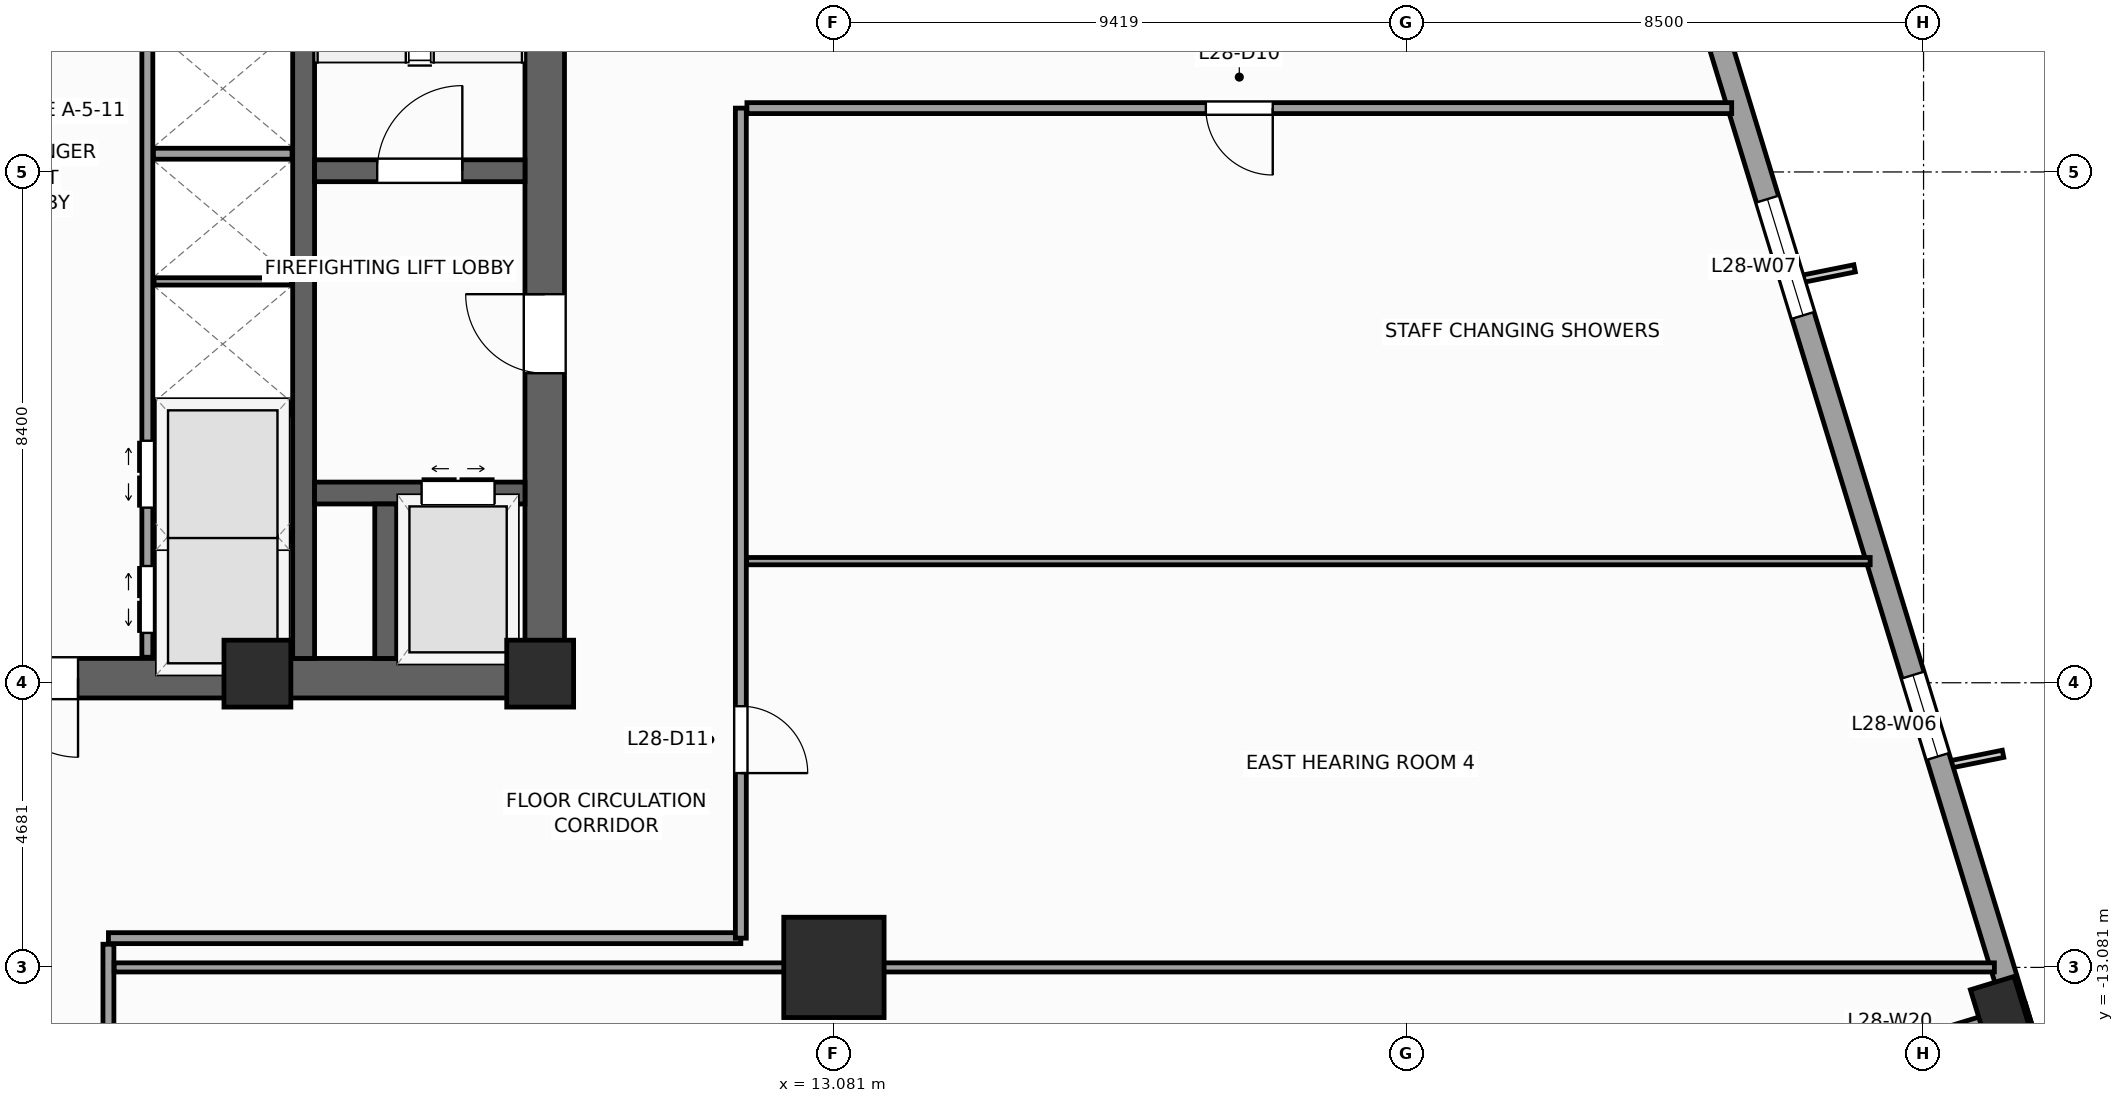
"""IFC4 building model, lengths in metres.
Left out: names, types, materials, properties, quantities, classifications, styles, units other than length and angle.
Written with IfcOpenShell. Run it as: python <this file> out.ifc"""

import sys

from ifc_helpers import new_model, si_unit, direction, frame, frame_2d, origin, origin_2d, place, context, subcontext, project, spatial, rectangle, extrude, source, transform, mapped, element, fill, save


model = new_model("IFC4")
c1 = context("Model", 3, precision=1e-05, world=origin(), true_north=direction((0.0, 1.0)))
c2 = subcontext(c1, "Body", "Model", "MODEL_VIEW")
j1 = project(units=[si_unit("LENGTHUNIT", "METRE"), si_unit("PLANEANGLEUNIT", "RADIAN")], contexts=[c1])
p1 = place(None, origin())
s1 = spatial("IfcSite", under=j1, at=p1, CompositionType="ELEMENT")
p2 = place(p1, origin())
s2 = spatial("IfcBuilding", under=s1, at=p2, CompositionType="ELEMENT")
p3 = place(p2, frame((0.0, 0.0, 119.2)))
s3 = spatial("IfcBuildingStorey", under=s2, at=p3, CompositionType="ELEMENT", Elevation=119.2)
p4 = place(p3, frame((-8.65, -8.325, 0.0), z_axis=(0.0, 0.0, 1.0), x_axis=(1.0, 0.0, 0.0)))
e1 = element("IfcWall", 1, at=p4, inside=s3, PredefinedType="SHEAR", context=c2, shape_type="SweptSolid", body=[
    extrude(rectangle(XDim=17.3, YDim=0.65, at=frame_2d((8.65, 0.0))), origin(), (0.0, 0.0, 1.0), 4.0),
])
p5 = place(p4, frame((8.0, 0.0, 0.0)))
e2 = element("IfcOpeningElement", 2, at=p5, cuts=e1, PredefinedType="OPENING", context=c2, shape_type="SweptSolid", body=[
    extrude(rectangle(XDim=1.3, YDim=2.2, at=frame_2d((0.65, 1.1))), frame((0.0, 0.335, 0.0), z_axis=(0.0, -1.0, 0.0), x_axis=(1.0, 0.0, 0.0)), (0.0, 0.0, 1.0), 0.67),
])
p6 = place(p3, frame((8.325, -8.0, 0.0), z_axis=(0.0, 0.0, 1.0), x_axis=(0.0, 1.0, 0.0)))
e3 = element("IfcWall", 3, at=p6, inside=s3, PredefinedType="SHEAR", context=c2, shape_type="SweptSolid", body=[
    extrude(rectangle(XDim=16.0, YDim=0.65, at=frame_2d((8.0, 0.0))), origin(), (0.0, 0.0, 1.0), 4.0),
])
p7 = place(p6, frame((4.69, 0.0, 0.0)))
e4 = element("IfcOpeningElement", 4, at=p7, cuts=e3, PredefinedType="OPENING", context=c2, shape_type="SweptSolid", body=[
    extrude(rectangle(XDim=1.3, YDim=2.2, at=frame_2d((0.65, 1.1))), frame((0.0, 0.335, 0.0), z_axis=(0.0, -1.0, 0.0), x_axis=(1.0, 0.0, 0.0)), (0.0, 0.0, 1.0), 0.67),
])
p8 = place(p3, frame((4.36, -8.0, 0.0), z_axis=(0.0, 0.0, 1.0), x_axis=(0.0, 1.0, 0.0)))
e5 = element("IfcWall", 5, at=p8, inside=s3, PredefinedType="SHEAR", context=c2, shape_type="SweptSolid", body=[
    extrude(rectangle(XDim=16.0, YDim=0.36, at=frame_2d((8.0, 0.0))), origin(), (0.0, 0.0, 1.0), 4.0),
])
p9 = place(p3, frame((4.54, 0.02, 0.0), z_axis=(0.0, 0.0, 1.0), x_axis=(1.0, 0.0, 0.0)))
e6 = element("IfcWall", 6, at=p9, inside=s3, PredefinedType="SHEAR", context=c2, shape_type="SweptSolid", body=[
    extrude(rectangle(XDim=3.46, YDim=0.36, at=frame_2d((1.73, 0.0))), origin(), (0.0, 0.0, 1.0), 4.0),
])
p10 = place(p9, frame((1.03, 0.0, 0.0)))
e7 = element("IfcOpeningElement", 7, at=p10, cuts=e6, PredefinedType="OPENING", context=c2, shape_type="SweptSolid", body=[
    extrude(rectangle(XDim=1.4, YDim=2.2, at=frame_2d((0.7, 1.1))), frame((0.0, 0.19, 0.0), z_axis=(0.0, -1.0, 0.0), x_axis=(1.0, 0.0, 0.0)), (0.0, 0.0, 1.0), 0.38),
])
p11 = place(p3, frame((4.54, -5.28, 0.0), z_axis=(0.0, 0.0, 1.0), x_axis=(1.0, 0.0, 0.0)))
e8 = element("IfcWall", 8, at=p11, inside=s3, PredefinedType="SHEAR", context=c2, shape_type="SweptSolid", body=[
    extrude(rectangle(XDim=3.46, YDim=0.36, at=frame_2d((1.73, 0.0))), origin(), (0.0, 0.0, 1.0), 4.0),
])
p12 = place(p11, frame((1.76, 0.0, 0.0)))
e9 = element("IfcOpeningElement", 9, at=p12, cuts=e8, PredefinedType="OPENING", context=c2, shape_type="SweptSolid", body=[
    extrude(rectangle(XDim=1.2, YDim=2.25, at=frame_2d((0.6, 1.125))), frame((0.0, 0.19, 0.0), z_axis=(0.0, -1.0, 0.0), x_axis=(1.0, 0.0, 0.0)), (0.0, 0.0, 1.0), 0.38),
])
p13 = place(p3, frame((5.71, -8.0, 0.0), z_axis=(0.0, 0.0, 1.0), x_axis=(0.0, 1.0, 0.0)))
e10 = element("IfcWall", 10, at=p13, inside=s3, PredefinedType="SHEAR", context=c2, shape_type="SweptSolid", body=[
    extrude(rectangle(XDim=2.54, YDim=0.36, at=frame_2d((1.27, 0.0))), origin(), (0.0, 0.0, 1.0), 4.0),
])
m1 = source(origin(), c2, "Body", "SweptSolid", [
    extrude(rectangle(XDim=1.1, YDim=1.1, at=origin_2d()), origin(), (0.0, 0.0, 1.0), 4.0),
])
for number, where, z_axis, x_axis in (
    (11, (8.25, -8.25, 0.0), (0.0, 0.0, 1.0), (1.0, 0.0, 0.0)),
    (12, (3.6, -8.25, 0.0), (0.0, 0.0, 1.0), (1.0, 0.0, 0.0)),
):
    element("IfcColumn", number, at=place(p3, frame(where, z_axis=z_axis, x_axis=x_axis)), inside=s3, PredefinedType="PILASTER", context=c2, shape_type="MappedRepresentation", body=[
        mapped(m1, transform((0.0, 0.0, 0.0), scale=1.0)),
    ])
m2 = source(origin(), c2, "Body", "SweptSolid", [
    extrude(rectangle(XDim=1.65, YDim=1.65, at=origin_2d()), origin(), (0.0, 0.0, 1.0), 4.0),
])
p14 = place(p3, frame((13.081, -13.081, 0.0), z_axis=(0.0, 0.0, 1.0), x_axis=(1.0, 0.0, 0.0)))
e13 = element("IfcColumn", 13, at=p14, inside=s3, PredefinedType="COLUMN", context=c2, shape_type="MappedRepresentation", body=[
    mapped(m2, transform((0.0, 0.0, 0.0), scale=1.0)),
])
m3 = source(origin(), c2, "Body", "SweptSolid", [
    extrude(rectangle(XDim=0.75, YDim=0.85, at=origin_2d()), origin(), (0.0, 0.0, 1.0), 4.0),
])
p15 = place(p3, frame((32.253, -13.746, 0.0), z_axis=(0.0, 0.0, 1.0), x_axis=(0.956304755963, 0.292371704723, 0.0)))
e14 = element("IfcColumn", 14, at=p15, inside=s3, PredefinedType="COLUMN", context=c2, shape_type="MappedRepresentation", body=[
    mapped(m3, transform((0.0, 0.0, 0.0), scale=1.0)),
])
p16 = place(p3, frame((28.482, -15.144, 0.0), z_axis=(0.0, 0.0, 1.0), x_axis=(0.956304176051, 0.292373601522, 0.0)))
e15 = element("IfcWall", 15, at=p16, inside=s3, PredefinedType="STANDARD", context=c2, shape_type="SweptSolid", body=[
    extrude(rectangle(XDim=4.44, YDim=0.38, at=frame_2d((2.22, 0.0))), origin(), (0.0, 0.0, 1.0), 3.04),
])
p17 = place(p16, frame((1.52, 0.0, 0.51)))
e16 = element("IfcOpeningElement", 16, at=p17, cuts=e15, PredefinedType="OPENING", context=c2, shape_type="SweptSolid", body=[
    extrude(rectangle(XDim=1.4, YDim=2.4, at=frame_2d((0.7, 1.2))), frame((0.0, 0.2, 0.0), z_axis=(0.0, -1.0, 0.0), x_axis=(1.0, 0.0, 0.0)), (0.0, 0.0, 1.0), 0.4),
])
p18 = place(p3, frame((32.658, -14.265, 0.0), z_axis=(0.0, 0.0, 1.0), x_axis=(-0.292373127906, 0.956304320851, 0.0)))
e17 = element("IfcWall", 17, at=p18, inside=s3, PredefinedType="STANDARD", context=c2, shape_type="SweptSolid", body=[
    extrude(rectangle(XDim=46.38, YDim=0.38, at=frame_2d((23.19, 0.0))), origin(), (0.0, 0.0, 1.0), 3.14),
])
p19 = place(p18, frame((28.265, 0.0, 0.0)))
e18 = element("IfcOpeningElement", 18, at=p19, cuts=e17, PredefinedType="OPENING", context=c2, shape_type="SweptSolid", body=[
    extrude(rectangle(XDim=1.05, YDim=2.25, at=frame_2d((0.525, 1.125))), frame((0.0, 0.2, 0.0), z_axis=(0.0, -1.0, 0.0), x_axis=(1.0, 0.0, 0.0)), (0.0, 0.0, 1.0), 0.4),
])
p20 = place(p18, frame((4.865, 0.0, 0.51)))
e19 = element("IfcOpeningElement", 19, at=p20, cuts=e17, PredefinedType="OPENING", context=c2, shape_type="SweptSolid", body=[
    extrude(rectangle(XDim=1.4, YDim=2.4, at=frame_2d((0.7, 1.2))), frame((0.0, 0.2, 0.0), z_axis=(0.0, -1.0, 0.0), x_axis=(1.0, 0.0, 0.0)), (0.0, 0.0, 1.0), 0.4),
])
p21 = place(p18, frame((12.45, 0.0, 0.51)))
e20 = element("IfcOpeningElement", 20, at=p21, cuts=e17, PredefinedType="OPENING", context=c2, shape_type="SweptSolid", body=[
    extrude(rectangle(XDim=2.0, YDim=2.4, at=frame_2d((1.0, 1.2))), frame((0.0, 0.2, 0.0), z_axis=(0.0, -1.0, 0.0), x_axis=(1.0, 0.0, 0.0)), (0.0, 0.0, 1.0), 0.4),
])
p22 = place(p18, frame((30.538, 0.0, 0.51)))
e21 = element("IfcOpeningElement", 21, at=p22, cuts=e17, PredefinedType="OPENING", context=c2, shape_type="SweptSolid", body=[
    extrude(rectangle(XDim=2.0, YDim=2.4, at=frame_2d((1.0, 1.2))), frame((0.0, 0.2, 0.0), z_axis=(0.0, -1.0, 0.0), x_axis=(1.0, 0.0, 0.0)), (0.0, 0.0, 1.0), 0.4),
])
p23 = place(p18, frame((39.187, 0.0, 0.51)))
e22 = element("IfcOpeningElement", 22, at=p23, cuts=e17, PredefinedType="OPENING", context=c2, shape_type="SweptSolid", body=[
    extrude(rectangle(XDim=1.4, YDim=2.4, at=frame_2d((0.7, 1.2))), frame((0.0, 0.2, 0.0), z_axis=(0.0, -1.0, 0.0), x_axis=(1.0, 0.0, 0.0)), (0.0, 0.0, 1.0), 0.4),
])
p24 = place(p3, frame((1.79, -7.98, 0.0), z_axis=(0.0, 0.0, 1.0), x_axis=(0.0, 1.0, 0.0)))
e23 = element("IfcWall", 23, at=p24, inside=s3, PredefinedType="PARTITIONING", context=c2, shape_type="SweptSolid", body=[
    extrude(rectangle(XDim=12.38, YDim=0.18, at=frame_2d((6.19, 0.0))), origin(), (0.0, 0.0, 1.0), 3.74),
])
p25 = place(p24, frame((0.4, 0.0, 0.0)))
e24 = element("IfcOpeningElement", 24, at=p25, cuts=e23, PredefinedType="OPENING", context=c2, shape_type="SweptSolid", body=[
    extrude(rectangle(XDim=1.1, YDim=2.2, at=frame_2d((0.55, 1.1))), frame((0.0, 0.1, 0.0), z_axis=(0.0, -1.0, 0.0), x_axis=(1.0, 0.0, 0.0)), (0.0, 0.0, 1.0), 0.2),
])
p26 = place(p24, frame((2.46, 0.0, 0.0)))
e25 = element("IfcOpeningElement", 25, at=p26, cuts=e23, PredefinedType="OPENING", context=c2, shape_type="SweptSolid", body=[
    extrude(rectangle(XDim=1.1, YDim=2.2, at=frame_2d((0.55, 1.1))), frame((0.0, 0.1, 0.0), z_axis=(0.0, -1.0, 0.0), x_axis=(1.0, 0.0, 0.0)), (0.0, 0.0, 1.0), 0.2),
])
for number, where, z_axis, x_axis in (
    (26, (1.89, -3.9, 0.0), (0.0, 0.0, 1.0), (1.0, 0.0, 0.0)),
    (27, (1.89, 0.3, 0.0), (0.0, 0.0, 1.0), (1.0, 0.0, 0.0)),
):
    element("IfcWall", number, at=place(p3, frame(where, z_axis=z_axis, x_axis=x_axis)), inside=s3, PredefinedType="PARTITIONING", context=c2, shape_type="SweptSolid", body=[
        extrude(rectangle(XDim=2.28, YDim=0.18, at=frame_2d((1.14, 0.0))), origin(), (0.0, 0.0, 1.0), 3.74),
    ])
for number, where, z_axis, x_axis in (
    (28, (1.9, -6.0, 0.0), (0.0, 0.0, 1.0), (1.0, 0.0, 0.0)),
    (29, (1.9, -1.8, 0.0), (0.0, 0.0, 1.0), (1.0, 0.0, 0.0)),
):
    element("IfcWall", number, at=place(p3, frame(where, z_axis=z_axis, x_axis=x_axis)), inside=s3, PredefinedType="PARTITIONING", context=c2, shape_type="SweptSolid", body=[
        extrude(rectangle(XDim=2.26, YDim=0.12, at=frame_2d((1.13, 0.0))), origin(), (0.0, 0.0, 1.0), 3.74),
    ])
p27 = place(p3, frame((1.15, -12.6, 0.0), z_axis=(0.0, 0.0, 1.0), x_axis=(1.0, 0.0, 0.0)))
e30 = element("IfcWall", 30, at=p27, inside=s3, PredefinedType="PARTITIONING", context=c2, shape_type="SweptSolid", body=[
    extrude(rectangle(XDim=10.4, YDim=0.18, at=frame_2d((5.2, 0.0))), origin(), (0.0, 0.0, 1.0), 3.74),
])
p28 = place(p3, frame((11.55, -12.6, 0.0), z_axis=(0.0, 0.0, 1.0), x_axis=(0.0, 1.0, 0.0)))
e31 = element("IfcWall", 31, at=p28, inside=s3, PredefinedType="PARTITIONING", context=c2, shape_type="SweptSolid", body=[
    extrude(rectangle(XDim=13.65, YDim=0.18, at=frame_2d((6.825, 0.0))), origin(), (0.0, 0.0, 1.0), 3.74),
])
p29 = place(p28, frame((2.714, 0.0, 0.0)))
e32 = element("IfcOpeningElement", 32, at=p29, cuts=e31, PredefinedType="OPENING", context=c2, shape_type="SweptSolid", body=[
    extrude(rectangle(XDim=1.1, YDim=2.2, at=frame_2d((0.55, 1.1))), frame((0.0, 0.1, 0.0), z_axis=(0.0, -1.0, 0.0), x_axis=(1.0, 0.0, 0.0)), (0.0, 0.0, 1.0), 0.2),
])
p30 = place(p3, frame((11.65, 1.05, 0.0), z_axis=(0.0, 0.0, 1.0), x_axis=(1.0, 0.0, 0.0)))
e33 = element("IfcWall", 33, at=p30, inside=s3, PredefinedType="PARTITIONING", context=c2, shape_type="SweptSolid", body=[
    extrude(rectangle(XDim=16.195, YDim=0.18, at=frame_2d((8.097, 0.0))), origin(), (0.0, 0.0, 1.0), 3.74),
])
p31 = place(p30, frame((7.547, 0.0, 0.0)))
e34 = element("IfcOpeningElement", 34, at=p31, cuts=e33, PredefinedType="OPENING", context=c2, shape_type="SweptSolid", body=[
    extrude(rectangle(XDim=1.1, YDim=2.2, at=frame_2d((0.55, 1.1))), frame((0.0, 0.1, 0.0), z_axis=(0.0, -1.0, 0.0), x_axis=(1.0, 0.0, 0.0)), (0.0, 0.0, 1.0), 0.2),
])
p32 = place(p3, frame((1.15, -27.814, 0.0), z_axis=(0.0, 0.0, 1.0), x_axis=(0.0, 1.0, 0.0)))
e35 = element("IfcWall", 35, at=p32, inside=s3, PredefinedType="PARTITIONING", context=c2, shape_type="SweptSolid", body=[
    extrude(rectangle(XDim=15.114, YDim=0.18, at=frame_2d((7.557, 0.0))), origin(), (0.0, 0.0, 1.0), 3.74),
])
p33 = place(p32, frame((6.981, 0.0, 0.0)))
e36 = element("IfcOpeningElement", 36, at=p33, cuts=e35, PredefinedType="OPENING", context=c2, shape_type="SweptSolid", body=[
    extrude(rectangle(XDim=1.1, YDim=2.2, at=frame_2d((0.55, 1.1))), frame((0.0, 0.1, 0.0), z_axis=(0.0, -1.0, 0.0), x_axis=(1.0, 0.0, 0.0)), (0.0, 0.0, 1.0), 0.2),
])
p34 = place(p3, frame((1.245, -13.081, 0.0), z_axis=(0.0, 0.0, 1.0), x_axis=(1.0, 0.0, 0.0)))
e37 = element("IfcWall", 37, at=p34, inside=s3, PredefinedType="PARTITIONING", context=c2, shape_type="SweptSolid", body=[
    extrude(rectangle(XDim=30.92, YDim=0.15, at=frame_2d((15.46, 0.0))), origin(), (0.0, 0.0, 1.0), 2.732),
])
p35 = place(p3, frame((11.645, -6.4, 0.0), z_axis=(0.0, 0.0, 1.0), x_axis=(1.0, 0.0, 0.0)))
e38 = element("IfcWall", 38, at=p35, inside=s3, PredefinedType="PARTITIONING", context=c2, shape_type="SweptSolid", body=[
    extrude(rectangle(XDim=18.477, YDim=0.12, at=frame_2d((9.239, 0.0))), origin(), (0.0, 0.0, 1.0), 3.74),
])
m4 = source(origin(), c2, "Body", "SweptSolid", [
    extrude(rectangle(XDim=1.4, YDim=2.4, at=frame_2d((0.7, 1.2))), frame((0.0, 0.03, 0.0), z_axis=(0.0, -1.0, 0.0), x_axis=(1.0, 0.0, 0.0)), (0.0, 0.0, 1.0), 0.06),
])
p36 = place(p20, origin())
e39 = element("IfcWindow", 39, at=p36, inside=s3, PartitioningType="SINGLE_PANEL", PredefinedType="WINDOW", context=c2, shape_type="MappedRepresentation", body=[
    mapped(m4, transform((0.0, 0.0, 0.0), scale=1.0)),
])
fill(e19, e39)
m5 = source(origin(), c2, "Body", "SweptSolid", [
    extrude(rectangle(XDim=2.0, YDim=2.4, at=frame_2d((1.0, 1.2))), frame((0.0, 0.03, 0.0), z_axis=(0.0, -1.0, 0.0), x_axis=(1.0, 0.0, 0.0)), (0.0, 0.0, 1.0), 0.06),
])
p37 = place(p21, origin())
e40 = element("IfcWindow", 40, at=p37, inside=s3, PartitioningType="SINGLE_PANEL", PredefinedType="WINDOW", context=c2, shape_type="MappedRepresentation", body=[
    mapped(m5, transform((0.0, 0.0, 0.0), scale=1.0)),
])
fill(e20, e40)
m6 = source(origin(), c2, "Body", "SweptSolid", [
    extrude(rectangle(XDim=1.4, YDim=2.2, at=frame_2d((0.7, 1.1))), frame((0.0, 0.025, 0.0), z_axis=(0.0, -1.0, 0.0), x_axis=(1.0, 0.0, 0.0)), (0.0, 0.0, 1.0), 0.05),
])
p38 = place(p10, origin())
e41 = element("IfcDoor", 41, at=p38, inside=s3, OperationType="SINGLE_SWING_RIGHT", PredefinedType="DOOR", context=c2, shape_type="MappedRepresentation", body=[
    mapped(m6, transform((0.0, 0.0, 0.0), scale=1.0)),
])
fill(e7, e41)
m7 = source(origin(), c2, "Body", "SweptSolid", [
    extrude(rectangle(XDim=1.3, YDim=2.2, at=frame_2d((0.65, 1.1))), frame((0.0, 0.025, 0.0), z_axis=(0.0, -1.0, 0.0), x_axis=(1.0, 0.0, 0.0)), (0.0, 0.0, 1.0), 0.05),
])
p39 = place(p7, origin())
e42 = element("IfcDoor", 42, at=p39, inside=s3, OperationType="SINGLE_SWING_RIGHT", PredefinedType="DOOR", context=c2, shape_type="MappedRepresentation", body=[
    mapped(m7, transform((0.0, 0.0, 0.0), scale=1.0)),
])
fill(e4, e42)
p40 = place(p5, frame((1.3, 0.0, 0.0), z_axis=(0.0, 0.0, 1.0), x_axis=(-1.0, 0.0, 0.0)))
e43 = element("IfcDoor", 43, at=p40, inside=s3, OperationType="SINGLE_SWING_RIGHT", PredefinedType="DOOR", context=c2, shape_type="MappedRepresentation", body=[
    mapped(m7, transform((0.0, 0.0, 0.0), scale=1.0)),
])
fill(e2, e43)
m8 = source(origin(), c2, "Body", "SweptSolid", [
    extrude(rectangle(XDim=1.2, YDim=2.25, at=frame_2d((0.6, 1.125))), frame((0.0, 0.025, 0.0), z_axis=(0.0, -1.0, 0.0), x_axis=(1.0, 0.0, 0.0)), (0.0, 0.0, 1.0), 0.05),
])
p41 = place(p12, origin())
e44 = element("IfcDoor", 44, at=p41, inside=s3, OperationType="DOUBLE_DOOR_SLIDING", PredefinedType="DOOR", context=c2, shape_type="MappedRepresentation", body=[
    mapped(m8, transform((0.0, 0.0, 0.0), scale=1.0)),
])
fill(e9, e44)
m9 = source(origin(), c2, "Body", "SweptSolid", [
    extrude(rectangle(XDim=1.1, YDim=2.2, at=frame_2d((0.55, 1.1))), frame((0.0, 0.025, 0.0), z_axis=(0.0, -1.0, 0.0), x_axis=(1.0, 0.0, 0.0)), (0.0, 0.0, 1.0), 0.05),
])
p42 = place(p25, origin())
e45 = element("IfcDoor", 45, at=p42, inside=s3, OperationType="DOUBLE_DOOR_SLIDING", PredefinedType="DOOR", context=c2, shape_type="MappedRepresentation", body=[
    mapped(m9, transform((0.0, 0.0, 0.0), scale=1.0)),
])
fill(e24, e45)
p43 = place(p26, origin())
e46 = element("IfcDoor", 46, at=p43, inside=s3, OperationType="DOUBLE_DOOR_SLIDING", PredefinedType="DOOR", context=c2, shape_type="MappedRepresentation", body=[
    mapped(m9, transform((0.0, 0.0, 0.0), scale=1.0)),
])
fill(e25, e46)
p44 = place(p31, frame((1.1, 0.0, 0.0), z_axis=(0.0, 0.0, 1.0), x_axis=(-1.0, 0.0, 0.0)))
e47 = element("IfcDoor", 47, at=p44, inside=s3, OperationType="SINGLE_SWING_RIGHT", PredefinedType="DOOR", context=c2, shape_type="MappedRepresentation", body=[
    mapped(m9, transform((0.0, 0.0, 0.0), scale=1.0)),
])
fill(e34, e47)
p45 = place(p29, frame((1.1, 0.0, 0.0), z_axis=(0.0, 0.0, 1.0), x_axis=(-1.0, 0.0, 0.0)))
e48 = element("IfcDoor", 48, at=p45, inside=s3, OperationType="SINGLE_SWING_LEFT", PredefinedType="DOOR", context=c2, shape_type="MappedRepresentation", body=[
    mapped(m9, transform((0.0, 0.0, 0.0), scale=1.0)),
])
fill(e32, e48)
save(model, sys.argv[1])
